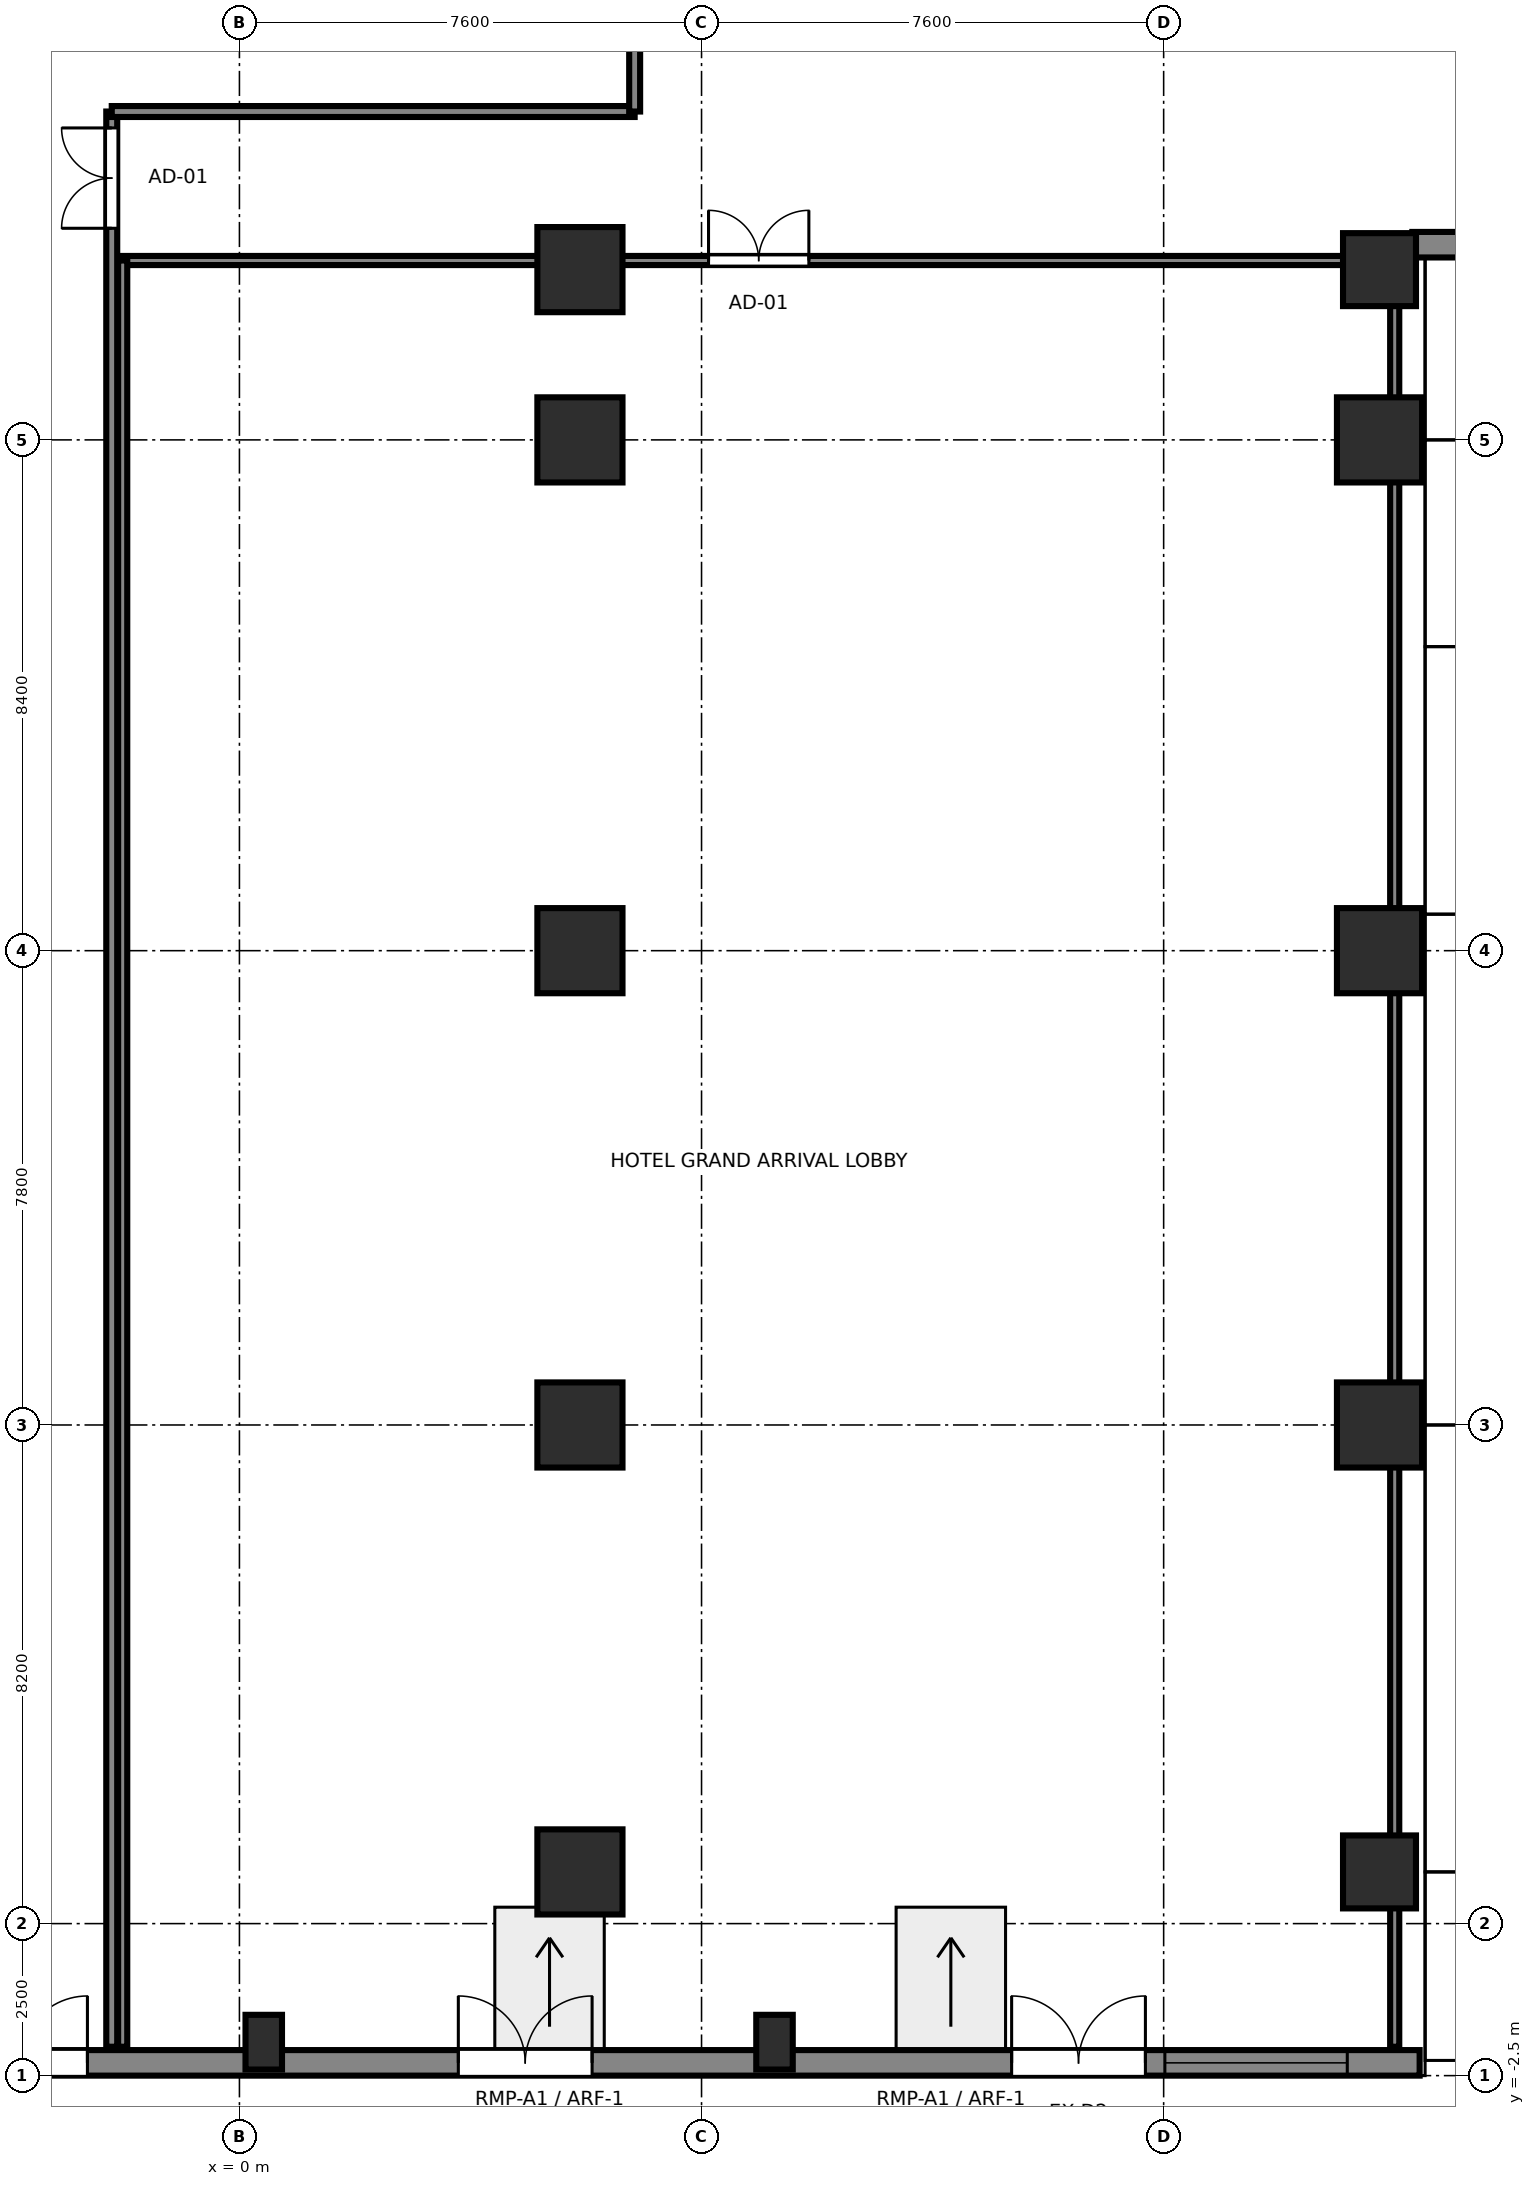
"""IFC4 building model, lengths in metres.
Left out: names, types, materials, properties, quantities, classifications, styles, units other than length and angle.
Written with IfcOpenShell. Run it as: python <this file> out.ifc"""

import sys

from ifc_helpers import new_model, si_unit, direction, frame, frame_2d, origin, origin_2d, place, context, subcontext, project, spatial, rectangle, circle, extrude, source, transform, mapped, element, fill, save


model = new_model("IFC4")
c1 = context("Model", 3, precision=1e-05, world=origin(), true_north=direction((0.0, 1.0)))
c2 = subcontext(c1, "Body", "Model", "MODEL_VIEW")
j1 = project(units=[si_unit("LENGTHUNIT", "METRE"), si_unit("PLANEANGLEUNIT", "RADIAN")], contexts=[c1])
p1 = place(None, origin())
s1 = spatial("IfcSite", under=j1, at=p1, CompositionType="ELEMENT")
p2 = place(p1, origin())
s2 = spatial("IfcBuilding", under=s1, at=p2, CompositionType="ELEMENT")
p3 = place(p2, origin())
s3 = spatial("IfcBuildingStorey", under=s2, at=p3, CompositionType="ELEMENT", Elevation=0.0)
m1 = source(origin(), c2, "Body", "SweptSolid", [
    extrude(circle(Radius=0.6, at=origin_2d()), origin(), (0.0, 0.0, 1.0), 6.0),
])
p4 = place(p3, frame((18.75, 0.85, 0.0), z_axis=(0.0, 0.0, 1.0), x_axis=(1.0, 0.0, 0.0)))
e1 = element("IfcColumn", 1, at=p4, inside=s3, PredefinedType="COLUMN", context=c2, shape_type="MappedRepresentation", body=[
    mapped(m1, transform((0.0, 0.0, 0.0), x_axis=(1.0, 0.0, 0.0), y_axis=(0.0, 1.0, 0.0), z_axis=(0.0, 0.0, 1.0), scale=1.0)),
])
m2 = source(origin(), c2, "Body", "SweptSolid", [
    extrude(rectangle(XDim=1.4, YDim=1.4, at=origin_2d()), origin(), (0.0, 0.0, 1.0), 6.0),
])
for number, where, z_axis, x_axis in (
    (2, (18.75, 8.2, 0.0), (0.0, 0.0, 1.0), (1.0, 0.0, 0.0)),
    (3, (18.75, 16.0, 0.0), (0.0, 0.0, 1.0), (1.0, 0.0, 0.0)),
    (4, (18.75, 24.4, 0.0), (0.0, 0.0, 1.0), (1.0, 0.0, 0.0)),
):
    element("IfcColumn", number, at=place(p3, frame(where, z_axis=z_axis, x_axis=x_axis)), inside=s3, PredefinedType="COLUMN", context=c2, shape_type="MappedRepresentation", body=[
        mapped(m2, transform((0.0, 0.0, 0.0), x_axis=(1.0, 0.0, 0.0), y_axis=(0.0, 1.0, 0.0), z_axis=(0.0, 0.0, 1.0), scale=1.0)),
    ])
p5 = place(p3, frame((18.75, 27.2, 0.0), z_axis=(0.0, 0.0, 1.0), x_axis=(1.0, 0.0, 0.0)))
e5 = element("IfcColumn", 5, at=p5, inside=s3, PredefinedType="COLUMN", context=c2, shape_type="MappedRepresentation", body=[
    mapped(m1, transform((0.0, 0.0, 0.0), x_axis=(1.0, 0.0, 0.0), y_axis=(0.0, 1.0, 0.0), z_axis=(0.0, 0.0, 1.0), scale=1.0)),
])
for number, where, z_axis, x_axis in (
    (6, (5.6, 0.85, 0.0), (0.0, 0.0, 1.0), (1.0, 0.0, 0.0)),
    (7, (5.6, 8.2, 0.0), (0.0, 0.0, 1.0), (1.0, 0.0, 0.0)),
    (8, (5.6, 16.0, 0.0), (0.0, 0.0, 1.0), (1.0, 0.0, 0.0)),
    (9, (5.6, 24.4, 0.0), (0.0, 0.0, 1.0), (1.0, 0.0, 0.0)),
    (10, (5.6, 27.2, 0.0), (0.0, 0.0, 1.0), (1.0, 0.0, 0.0)),
):
    element("IfcColumn", number, at=place(p3, frame(where, z_axis=z_axis, x_axis=x_axis)), inside=s3, PredefinedType="COLUMN", context=c2, shape_type="MappedRepresentation", body=[
        mapped(m2, transform((0.0, 0.0, 0.0), x_axis=(1.0, 0.0, 0.0), y_axis=(0.0, 1.0, 0.0), z_axis=(0.0, 0.0, 1.0), scale=1.0)),
    ])
m3 = source(origin(), c2, "Body", "SweptSolid", [
    extrude(rectangle(XDim=0.6, YDim=0.9, at=origin_2d()), origin(), (0.0, 0.0, 1.0), 6.0),
])
for number, where, z_axis, x_axis in (
    (11, (0.4, -1.95, 0.0), (0.0, 0.0, 1.0), (1.0, 0.0, 0.0)),
    (12, (8.8, -1.95, 0.0), (0.0, 0.0, 1.0), (1.0, 0.0, 0.0)),
):
    element("IfcColumn", number, at=place(p3, frame(where, z_axis=z_axis, x_axis=x_axis)), inside=s3, PredefinedType="PILASTER", context=c2, shape_type="MappedRepresentation", body=[
        mapped(m3, transform((0.0, 0.0, 0.0), x_axis=(1.0, 0.0, 0.0), y_axis=(0.0, 1.0, 0.0), z_axis=(0.0, 0.0, 1.0), scale=1.0)),
    ])
p6 = place(p3, frame((19.29, 27.61, 0.0), z_axis=(0.0, 0.0, 1.0), x_axis=(1.0, 0.0, 0.0)))
e13 = element("IfcWall", 13, at=p6, inside=s3, PredefinedType="SOLIDWALL", context=c2, shape_type="SweptSolid", body=[
    extrude(rectangle(XDim=18.42, YDim=0.42, at=frame_2d((9.21, 0.0))), origin(), (0.0, 0.0, 1.0), 5.74),
])
p7 = place(p6, frame((1.97, 0.0, 0.65)))
e14 = element("IfcOpeningElement", 14, at=p7, cuts=e13, PredefinedType="OPENING", context=c2, shape_type="SweptSolid", body=[
    extrude(rectangle(XDim=3.0, YDim=2.5, at=frame_2d((1.5, 1.25))), frame((0.0, 0.22, 0.0), z_axis=(0.0, -1.0, 0.0), x_axis=(1.0, 0.0, 0.0)), (0.0, 0.0, 1.0), 0.44),
])
p8 = place(p6, frame((7.71, 0.0, 0.65)))
e15 = element("IfcOpeningElement", 15, at=p8, cuts=e13, PredefinedType="OPENING", context=c2, shape_type="SweptSolid", body=[
    extrude(rectangle(XDim=3.0, YDim=2.5, at=frame_2d((1.5, 1.25))), frame((0.0, 0.22, 0.0), z_axis=(0.0, -1.0, 0.0), x_axis=(1.0, 0.0, 0.0)), (0.0, 0.0, 1.0), 0.44),
])
p9 = place(p6, frame((13.45, 0.0, 0.65)))
e16 = element("IfcOpeningElement", 16, at=p9, cuts=e13, PredefinedType="OPENING", context=c2, shape_type="SweptSolid", body=[
    extrude(rectangle(XDim=3.0, YDim=2.5, at=frame_2d((1.5, 1.25))), frame((0.0, 0.22, 0.0), z_axis=(0.0, -1.0, 0.0), x_axis=(1.0, 0.0, 0.0)), (0.0, 0.0, 1.0), 0.44),
])
p10 = place(p3, frame((-8.19, -2.29, 0.0), z_axis=(0.0, 0.0, 1.0), x_axis=(1.0, 0.0, 0.0)))
e17 = element("IfcWall", 17, at=p10, inside=s3, PredefinedType="SOLIDWALL", context=c2, shape_type="SweptSolid", body=[
    extrude(rectangle(XDim=27.6, YDim=0.42, at=frame_2d((13.8, 0.0))), origin(), (0.0, 0.0, 1.0), 5.74),
])
p11 = place(p10, frame((5.69, 0.0, 0.0), z_axis=(0.0, 0.0, 1.0), x_axis=(-1.0, 0.0, 0.0)))
e18 = element("IfcOpeningElement", 18, at=p11, cuts=e17, PredefinedType="OPENING", context=c2, shape_type="SweptSolid", body=[
    extrude(rectangle(XDim=2.2, YDim=2.25, at=frame_2d((1.1, 1.125))), frame((0.0, 0.22, 0.0), z_axis=(0.0, -1.0, 0.0), x_axis=(1.0, 0.0, 0.0)), (0.0, 0.0, 1.0), 0.44),
])
p12 = place(p10, frame((13.99, 0.0, 0.0), z_axis=(0.0, 0.0, 1.0), x_axis=(-1.0, 0.0, 0.0)))
e19 = element("IfcOpeningElement", 19, at=p12, cuts=e17, PredefinedType="OPENING", context=c2, shape_type="SweptSolid", body=[
    extrude(rectangle(XDim=2.2, YDim=2.25, at=frame_2d((1.1, 1.125))), frame((0.0, 0.22, 0.0), z_axis=(0.0, -1.0, 0.0), x_axis=(1.0, 0.0, 0.0)), (0.0, 0.0, 1.0), 0.44),
])
p13 = place(p10, frame((23.09, 0.0, 0.0), z_axis=(0.0, 0.0, 1.0), x_axis=(-1.0, 0.0, 0.0)))
e20 = element("IfcOpeningElement", 20, at=p13, cuts=e17, PredefinedType="OPENING", context=c2, shape_type="SweptSolid", body=[
    extrude(rectangle(XDim=2.2, YDim=2.25, at=frame_2d((1.1, 1.125))), frame((0.0, 0.22, 0.0), z_axis=(0.0, -1.0, 0.0), x_axis=(1.0, 0.0, 0.0)), (0.0, 0.0, 1.0), 0.44),
])
p14 = place(p10, frame((23.41, 0.0, 0.65)))
e21 = element("IfcOpeningElement", 21, at=p14, cuts=e17, PredefinedType="OPENING", context=c2, shape_type="SweptSolid", body=[
    extrude(rectangle(XDim=3.0, YDim=2.5, at=frame_2d((1.5, 1.25))), frame((0.0, 0.22, 0.0), z_axis=(0.0, -1.0, 0.0), x_axis=(1.0, 0.0, 0.0)), (0.0, 0.0, 1.0), 0.44),
])
p15 = place(p3, frame((-2.1, -2.025, 0.0), z_axis=(0.0, 0.0, 1.0), x_axis=(0.0, 1.0, 0.0)))
e22 = element("IfcWall", 22, at=p15, inside=s3, PredefinedType="PARTITIONING", context=c2, shape_type="SweptSolid", body=[
    extrude(rectangle(XDim=31.825, YDim=0.18, at=frame_2d((15.913, 0.0))), origin(), (0.0, 0.0, 1.0), 5.74),
])
p16 = place(p15, frame((29.905, 0.0, 0.0)))
e23 = element("IfcOpeningElement", 23, at=p16, cuts=e22, PredefinedType="OPENING", context=c2, shape_type="SweptSolid", body=[
    extrude(rectangle(XDim=1.65, YDim=2.15, at=frame_2d((0.825, 1.075))), frame((0.0, 0.1, 0.0), z_axis=(0.0, -1.0, 0.0), x_axis=(1.0, 0.0, 0.0)), (0.0, 0.0, 1.0), 0.2),
])
p17 = place(p3, frame((-2.1, 29.8, 0.0), z_axis=(0.0, 0.0, 1.0), x_axis=(1.0, 0.0, 0.0)))
e24 = element("IfcWall", 24, at=p17, inside=s3, PredefinedType="PARTITIONING", context=c2, shape_type="SweptSolid", body=[
    extrude(rectangle(XDim=8.6, YDim=0.18, at=frame_2d((4.3, 0.0))), origin(), (0.0, 0.0, 1.0), 4.53),
])
p18 = place(p3, frame((6.5, 29.8, 0.0), z_axis=(0.0, 0.0, 1.0), x_axis=(0.0, 1.0, 0.0)))
e25 = element("IfcWall", 25, at=p18, inside=s3, PredefinedType="PARTITIONING", context=c2, shape_type="SweptSolid", body=[
    extrude(rectangle(XDim=4.195, YDim=0.18, at=frame_2d((2.098, 0.0))), origin(), (0.0, 0.0, 1.0), 5.74),
])
p19 = place(p3, frame((-1.92, 27.35, 0.0), z_axis=(0.0, 0.0, 1.0), x_axis=(1.0, 0.0, 0.0)))
e26 = element("IfcWall", 26, at=p19, inside=s3, PredefinedType="PARTITIONING", context=c2, shape_type="SweptSolid", body=[
    extrude(rectangle(XDim=20.92, YDim=0.15, at=frame_2d((10.46, 0.0))), origin(), (0.0, 0.0, 1.0), 4.53),
])
p20 = place(p19, frame((9.635, 0.0, 0.0)))
e27 = element("IfcOpeningElement", 27, at=p20, cuts=e26, PredefinedType="OPENING", context=c2, shape_type="SweptSolid", body=[
    extrude(rectangle(XDim=1.65, YDim=2.15, at=frame_2d((0.825, 1.075))), frame((0.0, 0.085, 0.0), z_axis=(0.0, -1.0, 0.0), x_axis=(1.0, 0.0, 0.0)), (0.0, 0.0, 1.0), 0.17),
])
p21 = place(p3, frame((-1.92, -2.025, 0.0), z_axis=(0.0, 0.0, 1.0), x_axis=(0.0, 1.0, 0.0)))
e28 = element("IfcWall", 28, at=p21, inside=s3, PredefinedType="PARTITIONING", context=c2, shape_type="SweptSolid", body=[
    extrude(rectangle(XDim=29.375, YDim=0.15, at=frame_2d((14.688, 0.0))), origin(), (0.0, 0.0, 1.0), 5.74),
])
p22 = place(p3, frame((19.0, -2.025, 0.0), z_axis=(0.0, 0.0, 1.0), x_axis=(0.0, 1.0, 0.0)))
e29 = element("IfcWall", 29, at=p22, inside=s3, PredefinedType="PARTITIONING", context=c2, shape_type="SweptSolid", body=[
    extrude(rectangle(XDim=29.425, YDim=0.15, at=frame_2d((14.712, 0.0))), origin(), (0.0, 0.0, 1.0), 5.74),
])
m4 = source(origin(), c2, "Body", "SweptSolid", [
    extrude(rectangle(XDim=2.2, YDim=2.25, at=frame_2d((1.1, 1.125))), frame((0.0, 0.025, 0.0), z_axis=(0.0, -1.0, 0.0), x_axis=(1.0, 0.0, 0.0)), (0.0, 0.0, 1.0), 0.05),
])
p23 = place(p11, origin())
e30 = element("IfcDoor", 30, at=p23, inside=s3, OperationType="DOUBLE_DOOR_SINGLE_SWING", PredefinedType="DOOR", context=c2, shape_type="MappedRepresentation", body=[
    mapped(m4, transform((0.0, 0.0, 0.0), x_axis=(1.0, 0.0, 0.0), y_axis=(0.0, 1.0, 0.0), z_axis=(0.0, 0.0, 1.0), scale=1.0)),
])
fill(e18, e30)
p24 = place(p12, origin())
e31 = element("IfcDoor", 31, at=p24, inside=s3, OperationType="DOUBLE_DOOR_SINGLE_SWING", PredefinedType="DOOR", context=c2, shape_type="MappedRepresentation", body=[
    mapped(m4, transform((0.0, 0.0, 0.0), x_axis=(1.0, 0.0, 0.0), y_axis=(0.0, 1.0, 0.0), z_axis=(0.0, 0.0, 1.0), scale=1.0)),
])
fill(e19, e31)
p25 = place(p13, origin())
e32 = element("IfcDoor", 32, at=p25, inside=s3, OperationType="DOUBLE_DOOR_SINGLE_SWING", PredefinedType="DOOR", context=c2, shape_type="MappedRepresentation", body=[
    mapped(m4, transform((0.0, 0.0, 0.0), x_axis=(1.0, 0.0, 0.0), y_axis=(0.0, 1.0, 0.0), z_axis=(0.0, 0.0, 1.0), scale=1.0)),
])
fill(e20, e32)
m5 = source(origin(), c2, "Body", "SweptSolid", [
    extrude(rectangle(XDim=3.0, YDim=2.5, at=frame_2d((1.5, 1.25))), frame((0.0, 0.09, 0.0), z_axis=(0.0, -1.0, 0.0), x_axis=(1.0, 0.0, 0.0)), (0.0, 0.0, 1.0), 0.06),
])
p26 = place(p14, origin())
e33 = element("IfcWindow", 33, at=p26, inside=s3, PartitioningType="TRIPLE_PANEL_HORIZONTAL", PredefinedType="WINDOW", context=c2, shape_type="MappedRepresentation", body=[
    mapped(m5, transform((0.0, 0.0, 0.0), x_axis=(1.0, 0.0, 0.0), y_axis=(0.0, 1.0, 0.0), z_axis=(0.0, 0.0, 1.0), scale=1.0)),
])
fill(e21, e33)
m6 = source(origin(), c2, "Body", "SweptSolid", [
    extrude(rectangle(XDim=1.65, YDim=2.15, at=frame_2d((0.825, 1.075))), frame((0.0, 0.025, 0.0), z_axis=(0.0, -1.0, 0.0), x_axis=(1.0, 0.0, 0.0)), (0.0, 0.0, 1.0), 0.05),
])
p27 = place(p16, origin())
e34 = element("IfcDoor", 34, at=p27, inside=s3, OperationType="DOUBLE_DOOR_SINGLE_SWING", PredefinedType="DOOR", context=c2, shape_type="MappedRepresentation", body=[
    mapped(m6, transform((0.0, 0.0, 0.0), x_axis=(1.0, 0.0, 0.0), y_axis=(0.0, 1.0, 0.0), z_axis=(0.0, 0.0, 1.0), scale=1.0)),
])
fill(e23, e34)
p28 = place(p20, origin())
e35 = element("IfcDoor", 35, at=p28, inside=s3, OperationType="DOUBLE_DOOR_SINGLE_SWING", PredefinedType="DOOR", context=c2, shape_type="MappedRepresentation", body=[
    mapped(m6, transform((0.0, 0.0, 0.0), x_axis=(1.0, 0.0, 0.0), y_axis=(0.0, 1.0, 0.0), z_axis=(0.0, 0.0, 1.0), scale=1.0)),
])
fill(e27, e35)
save(model, sys.argv[1])
